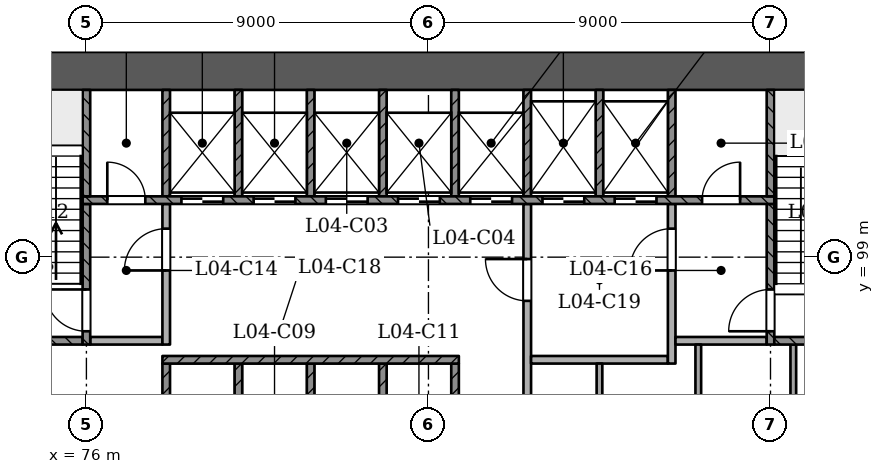
"""IFC4 building model, lengths in metres.
Left out: names, types, materials, properties, quantities, classifications, styles, units other than length and angle.
Written with IfcOpenShell. Run it as: python <this file> out.ifc"""

import sys

from ifc_helpers import new_model, si_unit, direction, frame, frame_2d, origin, place, context, subcontext, project, spatial, rectangle, extrude, element, fill, save


model = new_model("IFC4")
c1 = context("Model", 3, precision=1e-05, world=origin(), true_north=direction((0.0, 1.0)))
c2 = subcontext(c1, "Body", "Model", "MODEL_VIEW")
j1 = project(units=[si_unit("LENGTHUNIT", "METRE"), si_unit("PLANEANGLEUNIT", "RADIAN")], contexts=[c1])
p1 = place(None, origin())
s1 = spatial("IfcSite", under=j1, at=p1, CompositionType="ELEMENT")
p2 = place(p1, origin())
s2 = spatial("IfcBuilding", under=s1, at=p2, CompositionType="ELEMENT")
p3 = place(p2, frame((0.0, 0.0, 22.5)))
s3 = spatial("IfcBuildingStorey", under=s2, at=p3, CompositionType="ELEMENT", Elevation=22.5)
p4 = place(p3, frame((97.5, 103.9, 0.0), z_axis=(0.0, 0.0, 1.0), x_axis=(-1.0, 0.0, 0.0)))
e1 = element("IfcWall", 1, at=p4, inside=s3, PredefinedType="SHEAR", context=c2, shape_type="SweptSolid", body=[
    extrude(rectangle(XDim=25.5, YDim=1.0, at=frame_2d((12.75, 0.0))), origin(), (0.0, 0.0, 1.0), 4.5),
])
p5 = place(p3, frame((61.093, 96.062, 0.0), z_axis=(0.0, 0.0, 1.0), x_axis=(0.5000018851, -0.866024315419, 0.0)))
e2 = element("IfcWall", 2, at=p5, inside=s3, PredefinedType="PARTITIONING", context=c2, shape_type="SweptSolid", body=[
    extrude(rectangle(XDim=45.0, YDim=0.15, at=frame_2d((22.5, 0.0))), origin(), (0.0, 0.0, 1.0), 3.6),
])
p6 = place(p5, frame((6.15, 0.0, 0.0)))
e3 = element("IfcOpeningElement", 3, at=p6, cuts=e2, PredefinedType="OPENING", context=c2, shape_type="SweptSolid", body=[
    extrude(rectangle(XDim=1.2, YDim=2.1, at=frame_2d((0.6, 1.05))), frame((0.0, 0.085, 0.0), z_axis=(0.0, -1.0, 0.0), x_axis=(1.0, 0.0, 0.0)), (0.0, 0.0, 1.0), 0.171),
])
p7 = place(p5, frame((16.3, 0.0, 0.0)))
e4 = element("IfcOpeningElement", 4, at=p7, cuts=e2, PredefinedType="OPENING", context=c2, shape_type="SweptSolid", body=[
    extrude(rectangle(XDim=1.2, YDim=2.1, at=frame_2d((0.6, 1.05))), frame((0.0, 0.085, 0.0), z_axis=(0.0, -1.0, 0.0), x_axis=(1.0, 0.0, 0.0)), (0.0, 0.0, 1.0), 0.171),
])
p8 = place(p5, frame((24.25, 0.0, 0.0)))
e5 = element("IfcOpeningElement", 5, at=p8, cuts=e2, PredefinedType="OPENING", context=c2, shape_type="SweptSolid", body=[
    extrude(rectangle(XDim=1.0, YDim=2.1, at=frame_2d((0.5, 1.05))), frame((0.0, 0.085, 0.0), z_axis=(0.0, -1.0, 0.0), x_axis=(1.0, 0.0, 0.0)), (0.0, 0.0, 1.0), 0.171),
])
p9 = place(p5, frame((27.721, 0.0, 0.0)))
e6 = element("IfcOpeningElement", 6, at=p9, cuts=e2, PredefinedType="OPENING", context=c2, shape_type="SweptSolid", body=[
    extrude(rectangle(XDim=0.9, YDim=2.1, at=frame_2d((0.45, 1.05))), frame((0.0, 0.085, 0.0), z_axis=(0.0, -1.0, 0.0), x_axis=(1.0, 0.0, 0.0)), (0.0, 0.0, 1.0), 0.171),
])
p10 = place(p5, frame((29.971, 0.0, 0.0)))
e7 = element("IfcOpeningElement", 7, at=p10, cuts=e2, PredefinedType="OPENING", context=c2, shape_type="SweptSolid", body=[
    extrude(rectangle(XDim=0.9, YDim=2.1, at=frame_2d((0.45, 1.05))), frame((0.0, 0.085, 0.0), z_axis=(0.0, -1.0, 0.0), x_axis=(1.0, 0.0, 0.0)), (0.0, 0.0, 1.0), 0.171),
])
p11 = place(p5, frame((37.65, 0.0, 0.0)))
e8 = element("IfcOpeningElement", 8, at=p11, cuts=e2, PredefinedType="OPENING", context=c2, shape_type="SweptSolid", body=[
    extrude(rectangle(XDim=1.2, YDim=2.1, at=frame_2d((0.6, 1.05))), frame((0.0, 0.085, 0.0), z_axis=(0.0, -1.0, 0.0), x_axis=(1.0, 0.0, 0.0)), (0.0, 0.0, 1.0), 0.171),
])
p12 = place(p3, frame((86.407, 57.091, 0.0), z_axis=(0.0, 0.0, 1.0), x_axis=(0.49999953585, 0.866025671762, 0.0)))
e9 = element("IfcWall", 9, at=p12, inside=s3, PredefinedType="PARTITIONING", context=c2, shape_type="SweptSolid", body=[
    extrude(rectangle(XDim=45.0, YDim=0.15, at=frame_2d((22.5, 0.0))), origin(), (0.0, 0.0, 1.0), 3.6),
])
p13 = place(p12, frame((6.15, 0.0, 0.0)))
e10 = element("IfcOpeningElement", 10, at=p13, cuts=e9, PredefinedType="OPENING", context=c2, shape_type="SweptSolid", body=[
    extrude(rectangle(XDim=1.2, YDim=2.1, at=frame_2d((0.6, 1.05))), frame((0.0, 0.085, 0.0), z_axis=(0.0, -1.0, 0.0), x_axis=(1.0, 0.0, 0.0)), (0.0, 0.0, 1.0), 0.171),
])
p14 = place(p12, frame((16.3, 0.0, 0.0)))
e11 = element("IfcOpeningElement", 11, at=p14, cuts=e9, PredefinedType="OPENING", context=c2, shape_type="SweptSolid", body=[
    extrude(rectangle(XDim=1.2, YDim=2.1, at=frame_2d((0.6, 1.05))), frame((0.0, 0.085, 0.0), z_axis=(0.0, -1.0, 0.0), x_axis=(1.0, 0.0, 0.0)), (0.0, 0.0, 1.0), 0.171),
])
p15 = place(p12, frame((24.25, 0.0, 0.0)))
e12 = element("IfcOpeningElement", 12, at=p15, cuts=e9, PredefinedType="OPENING", context=c2, shape_type="SweptSolid", body=[
    extrude(rectangle(XDim=1.0, YDim=2.1, at=frame_2d((0.5, 1.05))), frame((0.0, 0.085, 0.0), z_axis=(0.0, -1.0, 0.0), x_axis=(1.0, 0.0, 0.0)), (0.0, 0.0, 1.0), 0.171),
])
p16 = place(p12, frame((30.9, 0.0, 0.0)))
e13 = element("IfcOpeningElement", 13, at=p16, cuts=e9, PredefinedType="OPENING", context=c2, shape_type="SweptSolid", body=[
    extrude(rectangle(XDim=1.2, YDim=2.1, at=frame_2d((0.6, 1.05))), frame((0.0, 0.085, 0.0), z_axis=(0.0, -1.0, 0.0), x_axis=(1.0, 0.0, 0.0)), (0.0, 0.0, 1.0), 0.171),
])
p17 = place(p12, frame((36.761, 0.0, 0.0)))
e14 = element("IfcOpeningElement", 14, at=p17, cuts=e9, PredefinedType="OPENING", context=c2, shape_type="SweptSolid", body=[
    extrude(rectangle(XDim=1.0, YDim=2.1, at=frame_2d((0.5, 1.05))), frame((0.0, 0.085, 0.0), z_axis=(0.0, -1.0, 0.0), x_axis=(1.0, 0.0, 0.0)), (0.0, 0.0, 1.0), 0.171),
])
p18 = place(p12, frame((39.011, 0.0, 0.0)))
e15 = element("IfcOpeningElement", 15, at=p18, cuts=e9, PredefinedType="OPENING", context=c2, shape_type="SweptSolid", body=[
    extrude(rectangle(XDim=1.0, YDim=2.1, at=frame_2d((0.5, 1.05))), frame((0.0, 0.085, 0.0), z_axis=(0.0, -1.0, 0.0), x_axis=(1.0, 0.0, 0.0)), (0.0, 0.0, 1.0), 0.171),
])
p19 = place(p12, frame((42.25, 0.0, 0.0)))
e16 = element("IfcOpeningElement", 16, at=p19, cuts=e9, PredefinedType="OPENING", context=c2, shape_type="SweptSolid", body=[
    extrude(rectangle(XDim=1.0, YDim=2.1, at=frame_2d((0.5, 1.05))), frame((0.0, 0.085, 0.0), z_axis=(0.0, -1.0, 0.0), x_axis=(1.0, 0.0, 0.0)), (0.0, 0.0, 1.0), 0.171),
])
for number, where, z_axis, x_axis in (
    (17, (78.1, 93.4, 0.0), (0.0, 0.0, 1.0), (0.0, 1.0, 0.0)),
    (18, (80.0, 93.4, 0.0), (0.0, 0.0, 1.0), (0.0, 1.0, 0.0)),
    (19, (81.9, 93.4, 0.0), (0.0, 0.0, 1.0), (0.0, 1.0, 0.0)),
    (20, (83.8, 93.4, 0.0), (0.0, 0.0, 1.0), (0.0, 1.0, 0.0)),
    (21, (85.7, 93.4, 0.0), (0.0, 0.0, 1.0), (0.0, 1.0, 0.0)),
):
    element("IfcWall", number, at=place(p3, frame(where, z_axis=z_axis, x_axis=x_axis)), inside=s3, PredefinedType="SOLIDWALL", context=c2, shape_type="SweptSolid", body=[
        extrude(rectangle(XDim=2.8, YDim=0.2, at=frame_2d((1.4, 0.0))), origin(), (0.0, 0.0, 1.0), 4.0),
    ])
p20 = place(p3, frame((87.6, 93.4, 0.0), z_axis=(0.0, 0.0, 1.0), x_axis=(0.0, 1.0, 0.0)))
e22 = element("IfcWall", 22, at=p20, inside=s3, PredefinedType="PARTITIONING", context=c2, shape_type="SweptSolid", body=[
    extrude(rectangle(XDim=7.0, YDim=0.2, at=frame_2d((3.5, 0.0))), origin(), (0.0, 0.0, 1.0), 4.0),
])
p21 = place(p20, frame((4.45, 0.0, 0.0)))
e23 = element("IfcOpeningElement", 23, at=p21, cuts=e22, PredefinedType="OPENING", context=c2, shape_type="SweptSolid", body=[
    extrude(rectangle(XDim=1.1, YDim=2.1, at=frame_2d((0.55, 1.05))), frame((0.0, 0.11, 0.0), z_axis=(0.0, -1.0, 0.0), x_axis=(1.0, 0.0, 0.0)), (0.0, 0.0, 1.0), 0.221),
])
p22 = place(p3, frame((89.5, 93.4, 0.0), z_axis=(0.0, 0.0, 1.0), x_axis=(0.0, 1.0, 0.0)))
e24 = element("IfcWall", 24, at=p22, inside=s3, PredefinedType="PARTITIONING", context=c2, shape_type="SweptSolid", body=[
    extrude(rectangle(XDim=2.8, YDim=0.15, at=frame_2d((1.4, 0.0))), origin(), (0.0, 0.0, 1.0), 4.0),
])
for number, where, z_axis, x_axis in (
    (25, (92.1, 93.4, 0.0), (0.0, 0.0, 1.0), (0.0, 1.0, 0.0)),
    (26, (94.6, 93.4, 0.0), (0.0, 0.0, 1.0), (0.0, 1.0, 0.0)),
):
    element("IfcWall", number, at=place(p3, frame(where, z_axis=z_axis, x_axis=x_axis)), inside=s3, PredefinedType="PARTITIONING", context=c2, shape_type="SweptSolid", body=[
        extrude(rectangle(XDim=3.3, YDim=0.15, at=frame_2d((1.65, 0.0))), origin(), (0.0, 0.0, 1.0), 4.0),
    ])
p23 = place(p3, frame((78.0, 96.3, 0.0), z_axis=(0.0, 0.0, 1.0), x_axis=(1.0, 0.0, 0.0)))
e27 = element("IfcWall", 27, at=p23, inside=s3, PredefinedType="SOLIDWALL", context=c2, shape_type="SweptSolid", body=[
    extrude(rectangle(XDim=7.8, YDim=0.2, at=frame_2d((3.9, 0.0))), origin(), (0.0, 0.0, 1.0), 4.0),
])
p24 = place(p3, frame((87.7, 96.3, 0.0), z_axis=(0.0, 0.0, 1.0), x_axis=(1.0, 0.0, 0.0)))
e28 = element("IfcWall", 28, at=p24, inside=s3, PredefinedType="PARTITIONING", context=c2, shape_type="SweptSolid", body=[
    extrude(rectangle(XDim=3.6, YDim=0.2, at=frame_2d((1.8, 0.0))), origin(), (0.0, 0.0, 1.0), 4.0),
])
p25 = place(p3, frame((91.4, 96.2, 0.0), z_axis=(0.0, 0.0, 1.0), x_axis=(0.0, 1.0, 0.0)))
e29 = element("IfcWall", 29, at=p25, inside=s3, PredefinedType="PARTITIONING", context=c2, shape_type="SweptSolid", body=[
    extrude(rectangle(XDim=4.2, YDim=0.2, at=frame_2d((2.1, 0.0))), origin(), (0.0, 0.0, 1.0), 4.0),
])
p26 = place(p25, frame((2.45, 0.0, 0.0)))
e30 = element("IfcOpeningElement", 30, at=p26, cuts=e29, PredefinedType="OPENING", context=c2, shape_type="SweptSolid", body=[
    extrude(rectangle(XDim=1.1, YDim=2.1, at=frame_2d((0.55, 1.05))), frame((0.0, 0.11, 0.0), z_axis=(0.0, -1.0, 0.0), x_axis=(1.0, 0.0, 0.0)), (0.0, 0.0, 1.0), 0.221),
])
p27 = place(p3, frame((73.0, 96.8, 0.0), z_axis=(0.0, 0.0, 1.0), x_axis=(1.0, 0.0, 0.0)))
e31 = element("IfcWall", 31, at=p27, inside=s3, PredefinedType="SOLIDWALL", context=c2, shape_type="SweptSolid", body=[
    extrude(rectangle(XDim=2.9, YDim=0.2, at=frame_2d((1.45, 0.0))), origin(), (0.0, 0.0, 1.0), 4.0),
])
p28 = place(p3, frame((76.0, 96.7, 0.0), z_axis=(0.0, 0.0, 1.0), x_axis=(0.0, 1.0, 0.0)))
e32 = element("IfcWall", 32, at=p28, inside=s3, PredefinedType="SOLIDWALL", context=c2, shape_type="SweptSolid", body=[
    extrude(rectangle(XDim=3.7, YDim=0.2, at=frame_2d((1.85, 0.0))), origin(), (0.0, 0.0, 1.0), 4.0),
])
p29 = place(p28, frame((0.35, 0.0, 0.0)))
e33 = element("IfcOpeningElement", 33, at=p29, cuts=e32, PredefinedType="OPENING", context=c2, shape_type="SweptSolid", body=[
    extrude(rectangle(XDim=1.1, YDim=2.1, at=frame_2d((0.55, 1.05))), frame((0.0, 0.11, 0.0), z_axis=(0.0, -1.0, 0.0), x_axis=(1.0, 0.0, 0.0)), (0.0, 0.0, 1.0), 0.221),
])
p30 = place(p3, frame((76.1, 96.8, 0.0), z_axis=(0.0, 0.0, 1.0), x_axis=(1.0, 0.0, 0.0)))
e34 = element("IfcWall", 34, at=p30, inside=s3, PredefinedType="PARTITIONING", context=c2, shape_type="SweptSolid", body=[
    extrude(rectangle(XDim=1.9, YDim=0.2, at=frame_2d((0.95, 0.0))), origin(), (0.0, 0.0, 1.0), 4.0),
])
p31 = place(p3, frame((78.1, 96.7, 0.0), z_axis=(0.0, 0.0, 1.0), x_axis=(0.0, 1.0, 0.0)))
e35 = element("IfcWall", 35, at=p31, inside=s3, PredefinedType="PARTITIONING", context=c2, shape_type="SweptSolid", body=[
    extrude(rectangle(XDim=3.7, YDim=0.2, at=frame_2d((1.85, 0.0))), origin(), (0.0, 0.0, 1.0), 4.0),
])
p32 = place(p31, frame((1.95, 0.0, 0.0)))
e36 = element("IfcOpeningElement", 36, at=p32, cuts=e35, PredefinedType="OPENING", context=c2, shape_type="SweptSolid", body=[
    extrude(rectangle(XDim=1.1, YDim=2.1, at=frame_2d((0.55, 1.05))), frame((0.0, 0.11, 0.0), z_axis=(0.0, -1.0, 0.0), x_axis=(1.0, 0.0, 0.0)), (0.0, 0.0, 1.0), 0.221),
])
p33 = place(p3, frame((91.5, 96.8, 0.0), z_axis=(0.0, 0.0, 1.0), x_axis=(1.0, 0.0, 0.0)))
e37 = element("IfcWall", 37, at=p33, inside=s3, PredefinedType="PARTITIONING", context=c2, shape_type="SweptSolid", body=[
    extrude(rectangle(XDim=2.4, YDim=0.2, at=frame_2d((1.2, 0.0))), origin(), (0.0, 0.0, 1.0), 4.0),
])
p34 = place(p3, frame((94.0, 96.7, 0.0), z_axis=(0.0, 0.0, 1.0), x_axis=(0.0, 1.0, 0.0)))
e38 = element("IfcWall", 38, at=p34, inside=s3, PredefinedType="SOLIDWALL", context=c2, shape_type="SweptSolid", body=[
    extrude(rectangle(XDim=3.7, YDim=0.2, at=frame_2d((1.85, 0.0))), origin(), (0.0, 0.0, 1.0), 4.0),
])
p35 = place(p34, frame((0.35, 0.0, 0.0)))
e39 = element("IfcOpeningElement", 39, at=p35, cuts=e38, PredefinedType="OPENING", context=c2, shape_type="SweptSolid", body=[
    extrude(rectangle(XDim=1.1, YDim=2.1, at=frame_2d((0.55, 1.05))), frame((0.0, 0.11, 0.0), z_axis=(0.0, -1.0, 0.0), x_axis=(1.0, 0.0, 0.0)), (0.0, 0.0, 1.0), 0.221),
])
p36 = place(p3, frame((94.1, 96.8, 0.0), z_axis=(0.0, 0.0, 1.0), x_axis=(1.0, 0.0, 0.0)))
e40 = element("IfcWall", 40, at=p36, inside=s3, PredefinedType="SOLIDWALL", context=c2, shape_type="SweptSolid", body=[
    extrude(rectangle(XDim=2.9, YDim=0.2, at=frame_2d((1.45, 0.0))), origin(), (0.0, 0.0, 1.0), 4.0),
])
p37 = place(p3, frame((75.9, 100.5, 0.0), z_axis=(0.0, 0.0, 1.0), x_axis=(1.0, 0.0, 0.0)))
e41 = element("IfcWall", 41, at=p37, inside=s3, PredefinedType="SOLIDWALL", context=c2, shape_type="SweptSolid", body=[
    extrude(rectangle(XDim=18.2, YDim=0.2, at=frame_2d((9.1, 0.0))), origin(), (0.0, 0.0, 1.0), 4.0),
])
p38 = place(p37, frame((2.6, 0.0, 0.0)))
e42 = element("IfcOpeningElement", 42, at=p38, cuts=e41, PredefinedType="OPENING", context=c2, shape_type="SweptSolid", body=[
    extrude(rectangle(XDim=1.1, YDim=2.1, at=frame_2d((0.55, 1.05))), frame((0.0, 0.11, 0.0), z_axis=(0.0, -1.0, 0.0), x_axis=(1.0, 0.0, 0.0)), (0.0, 0.0, 1.0), 0.221),
])
p39 = place(p37, frame((4.5, 0.0, 0.0)))
e43 = element("IfcOpeningElement", 43, at=p39, cuts=e41, PredefinedType="OPENING", context=c2, shape_type="SweptSolid", body=[
    extrude(rectangle(XDim=1.1, YDim=2.1, at=frame_2d((0.55, 1.05))), frame((0.0, 0.11, 0.0), z_axis=(0.0, -1.0, 0.0), x_axis=(1.0, 0.0, 0.0)), (0.0, 0.0, 1.0), 0.221),
])
p40 = place(p37, frame((6.4, 0.0, 0.0)))
e44 = element("IfcOpeningElement", 44, at=p40, cuts=e41, PredefinedType="OPENING", context=c2, shape_type="SweptSolid", body=[
    extrude(rectangle(XDim=1.1, YDim=2.1, at=frame_2d((0.55, 1.05))), frame((0.0, 0.11, 0.0), z_axis=(0.0, -1.0, 0.0), x_axis=(1.0, 0.0, 0.0)), (0.0, 0.0, 1.0), 0.221),
])
p41 = place(p37, frame((8.3, 0.0, 0.0)))
e45 = element("IfcOpeningElement", 45, at=p41, cuts=e41, PredefinedType="OPENING", context=c2, shape_type="SweptSolid", body=[
    extrude(rectangle(XDim=1.1, YDim=2.1, at=frame_2d((0.55, 1.05))), frame((0.0, 0.11, 0.0), z_axis=(0.0, -1.0, 0.0), x_axis=(1.0, 0.0, 0.0)), (0.0, 0.0, 1.0), 0.221),
])
p42 = place(p37, frame((10.2, 0.0, 0.0)))
e46 = element("IfcOpeningElement", 46, at=p42, cuts=e41, PredefinedType="OPENING", context=c2, shape_type="SweptSolid", body=[
    extrude(rectangle(XDim=1.1, YDim=2.1, at=frame_2d((0.55, 1.05))), frame((0.0, 0.11, 0.0), z_axis=(0.0, -1.0, 0.0), x_axis=(1.0, 0.0, 0.0)), (0.0, 0.0, 1.0), 0.221),
])
p43 = place(p37, frame((12.1, 0.0, 0.0)))
e47 = element("IfcOpeningElement", 47, at=p43, cuts=e41, PredefinedType="OPENING", context=c2, shape_type="SweptSolid", body=[
    extrude(rectangle(XDim=1.1, YDim=2.1, at=frame_2d((0.55, 1.05))), frame((0.0, 0.11, 0.0), z_axis=(0.0, -1.0, 0.0), x_axis=(1.0, 0.0, 0.0)), (0.0, 0.0, 1.0), 0.221),
])
p44 = place(p37, frame((14.0, 0.0, 0.0)))
e48 = element("IfcOpeningElement", 48, at=p44, cuts=e41, PredefinedType="OPENING", context=c2, shape_type="SweptSolid", body=[
    extrude(rectangle(XDim=1.1, YDim=2.1, at=frame_2d((0.55, 1.05))), frame((0.0, 0.11, 0.0), z_axis=(0.0, -1.0, 0.0), x_axis=(1.0, 0.0, 0.0)), (0.0, 0.0, 1.0), 0.221),
])
p45 = place(p37, frame((0.65, 0.0, 0.0)))
e49 = element("IfcOpeningElement", 49, at=p45, cuts=e41, PredefinedType="OPENING", context=c2, shape_type="SweptSolid", body=[
    extrude(rectangle(XDim=1.0, YDim=2.1, at=frame_2d((0.5, 1.05))), frame((0.0, 0.11, 0.0), z_axis=(0.0, -1.0, 0.0), x_axis=(1.0, 0.0, 0.0)), (0.0, 0.0, 1.0), 0.221),
])
p46 = place(p37, frame((16.3, 0.0, 0.0)))
e50 = element("IfcOpeningElement", 50, at=p46, cuts=e41, PredefinedType="OPENING", context=c2, shape_type="SweptSolid", body=[
    extrude(rectangle(XDim=1.0, YDim=2.1, at=frame_2d((0.5, 1.05))), frame((0.0, 0.11, 0.0), z_axis=(0.0, -1.0, 0.0), x_axis=(1.0, 0.0, 0.0)), (0.0, 0.0, 1.0), 0.221),
])
for number, where, z_axis, x_axis in (
    (51, (76.0, 100.6, 0.0), (0.0, 0.0, 1.0), (0.0, 1.0, 0.0)),
    (52, (78.1, 100.6, 0.0), (0.0, 0.0, 1.0), (0.0, 1.0, 0.0)),
    (53, (80.0, 100.6, 0.0), (0.0, 0.0, 1.0), (0.0, 1.0, 0.0)),
    (54, (81.9, 100.6, 0.0), (0.0, 0.0, 1.0), (0.0, 1.0, 0.0)),
    (55, (83.8, 100.6, 0.0), (0.0, 0.0, 1.0), (0.0, 1.0, 0.0)),
    (56, (85.7, 100.6, 0.0), (0.0, 0.0, 1.0), (0.0, 1.0, 0.0)),
    (57, (87.6, 100.6, 0.0), (0.0, 0.0, 1.0), (0.0, 1.0, 0.0)),
    (58, (89.5, 100.6, 0.0), (0.0, 0.0, 1.0), (0.0, 1.0, 0.0)),
    (59, (91.4, 100.6, 0.0), (0.0, 0.0, 1.0), (0.0, 1.0, 0.0)),
    (60, (94.0, 100.6, 0.0), (0.0, 0.0, 1.0), (0.0, 1.0, 0.0)),
):
    element("IfcWall", number, at=place(p3, frame(where, z_axis=z_axis, x_axis=x_axis)), inside=s3, PredefinedType="SOLIDWALL", context=c2, shape_type="SweptSolid", body=[
        extrude(rectangle(XDim=2.8, YDim=0.2, at=frame_2d((1.4, 0.0))), origin(), (0.0, 0.0, 1.0), 4.0),
    ])
p47 = place(p38, origin())
e61 = element("IfcDoor", 61, at=p47, inside=s3, OperationType="SLIDING_TO_RIGHT", PredefinedType="NOTDEFINED", context=c2, shape_type="SweptSolid", body=[
    extrude(rectangle(XDim=1.1, YDim=2.1, at=frame_2d((0.55, 1.05))), frame((0.0, 0.025, 0.0), z_axis=(0.0, -1.0, 0.0), x_axis=(1.0, 0.0, 0.0)), (0.0, 0.0, 1.0), 0.05),
])
fill(e42, e61)
p48 = place(p39, origin())
e62 = element("IfcDoor", 62, at=p48, inside=s3, OperationType="SLIDING_TO_LEFT", PredefinedType="NOTDEFINED", context=c2, shape_type="SweptSolid", body=[
    extrude(rectangle(XDim=1.1, YDim=2.1, at=frame_2d((0.55, 1.05))), frame((0.0, 0.025, 0.0), z_axis=(0.0, -1.0, 0.0), x_axis=(1.0, 0.0, 0.0)), (0.0, 0.0, 1.0), 0.05),
])
fill(e43, e62)
p49 = place(p40, origin())
e63 = element("IfcDoor", 63, at=p49, inside=s3, OperationType="SLIDING_TO_RIGHT", PredefinedType="NOTDEFINED", context=c2, shape_type="SweptSolid", body=[
    extrude(rectangle(XDim=1.1, YDim=2.1, at=frame_2d((0.55, 1.05))), frame((0.0, 0.025, 0.0), z_axis=(0.0, -1.0, 0.0), x_axis=(1.0, 0.0, 0.0)), (0.0, 0.0, 1.0), 0.05),
])
fill(e44, e63)
p50 = place(p41, origin())
e64 = element("IfcDoor", 64, at=p50, inside=s3, OperationType="SLIDING_TO_LEFT", PredefinedType="NOTDEFINED", context=c2, shape_type="SweptSolid", body=[
    extrude(rectangle(XDim=1.1, YDim=2.1, at=frame_2d((0.55, 1.05))), frame((0.0, 0.025, 0.0), z_axis=(0.0, -1.0, 0.0), x_axis=(1.0, 0.0, 0.0)), (0.0, 0.0, 1.0), 0.05),
])
fill(e45, e64)
p51 = place(p42, origin())
e65 = element("IfcDoor", 65, at=p51, inside=s3, OperationType="SLIDING_TO_RIGHT", PredefinedType="NOTDEFINED", context=c2, shape_type="SweptSolid", body=[
    extrude(rectangle(XDim=1.1, YDim=2.1, at=frame_2d((0.55, 1.05))), frame((0.0, 0.025, 0.0), z_axis=(0.0, -1.0, 0.0), x_axis=(1.0, 0.0, 0.0)), (0.0, 0.0, 1.0), 0.05),
])
fill(e46, e65)
p52 = place(p43, origin())
e66 = element("IfcDoor", 66, at=p52, inside=s3, OperationType="SLIDING_TO_RIGHT", PredefinedType="NOTDEFINED", context=c2, shape_type="SweptSolid", body=[
    extrude(rectangle(XDim=1.1, YDim=2.1, at=frame_2d((0.55, 1.05))), frame((0.0, 0.025, 0.0), z_axis=(0.0, -1.0, 0.0), x_axis=(1.0, 0.0, 0.0)), (0.0, 0.0, 1.0), 0.05),
])
fill(e47, e66)
p53 = place(p44, origin())
e67 = element("IfcDoor", 67, at=p53, inside=s3, OperationType="SLIDING_TO_LEFT", PredefinedType="NOTDEFINED", context=c2, shape_type="SweptSolid", body=[
    extrude(rectangle(XDim=1.1, YDim=2.1, at=frame_2d((0.55, 1.05))), frame((0.0, 0.025, 0.0), z_axis=(0.0, -1.0, 0.0), x_axis=(1.0, 0.0, 0.0)), (0.0, 0.0, 1.0), 0.05),
])
fill(e48, e67)
p54 = place(p29, origin())
e68 = element("IfcDoor", 68, at=p54, inside=s3, OperationType="SINGLE_SWING_RIGHT", PredefinedType="NOTDEFINED", context=c2, shape_type="SweptSolid", body=[
    extrude(rectangle(XDim=1.1, YDim=2.1, at=frame_2d((0.55, 1.05))), frame((0.0, 0.025, 0.0), z_axis=(0.0, -1.0, 0.0), x_axis=(1.0, 0.0, 0.0)), (0.0, 0.0, 1.0), 0.05),
])
fill(e33, e68)
p55 = place(p35, origin())
e69 = element("IfcDoor", 69, at=p55, inside=s3, OperationType="SINGLE_SWING_LEFT", PredefinedType="NOTDEFINED", context=c2, shape_type="SweptSolid", body=[
    extrude(rectangle(XDim=1.1, YDim=2.1, at=frame_2d((0.55, 1.05))), frame((0.0, 0.025, 0.0), z_axis=(0.0, -1.0, 0.0), x_axis=(1.0, 0.0, 0.0)), (0.0, 0.0, 1.0), 0.05),
])
fill(e39, e69)
p56 = place(p32, origin())
e70 = element("IfcDoor", 70, at=p56, inside=s3, OperationType="SINGLE_SWING_LEFT", PredefinedType="NOTDEFINED", context=c2, shape_type="SweptSolid", body=[
    extrude(rectangle(XDim=1.1, YDim=2.1, at=frame_2d((0.55, 1.05))), frame((0.0, 0.025, 0.0), z_axis=(0.0, -1.0, 0.0), x_axis=(1.0, 0.0, 0.0)), (0.0, 0.0, 1.0), 0.05),
])
fill(e36, e70)
p57 = place(p21, origin())
e71 = element("IfcDoor", 71, at=p57, inside=s3, OperationType="SINGLE_SWING_RIGHT", PredefinedType="NOTDEFINED", context=c2, shape_type="SweptSolid", body=[
    extrude(rectangle(XDim=1.1, YDim=2.1, at=frame_2d((0.55, 1.05))), frame((0.0, 0.025, 0.0), z_axis=(0.0, -1.0, 0.0), x_axis=(1.0, 0.0, 0.0)), (0.0, 0.0, 1.0), 0.05),
])
fill(e23, e71)
p58 = place(p26, origin())
e72 = element("IfcDoor", 72, at=p58, inside=s3, OperationType="SINGLE_SWING_LEFT", PredefinedType="NOTDEFINED", context=c2, shape_type="SweptSolid", body=[
    extrude(rectangle(XDim=1.1, YDim=2.1, at=frame_2d((0.55, 1.05))), frame((0.0, 0.025, 0.0), z_axis=(0.0, -1.0, 0.0), x_axis=(1.0, 0.0, 0.0)), (0.0, 0.0, 1.0), 0.05),
])
fill(e30, e72)
p59 = place(p45, origin())
e73 = element("IfcDoor", 73, at=p59, inside=s3, OperationType="SINGLE_SWING_LEFT", PredefinedType="NOTDEFINED", context=c2, shape_type="SweptSolid", body=[
    extrude(rectangle(XDim=1.0, YDim=2.1, at=frame_2d((0.5, 1.05))), frame((0.0, 0.025, 0.0), z_axis=(0.0, -1.0, 0.0), x_axis=(1.0, 0.0, 0.0)), (0.0, 0.0, 1.0), 0.05),
])
fill(e49, e73)
p60 = place(p46, origin())
e74 = element("IfcDoor", 74, at=p60, inside=s3, OperationType="SINGLE_SWING_RIGHT", PredefinedType="NOTDEFINED", context=c2, shape_type="SweptSolid", body=[
    extrude(rectangle(XDim=1.0, YDim=2.1, at=frame_2d((0.5, 1.05))), frame((0.0, 0.025, 0.0), z_axis=(0.0, -1.0, 0.0), x_axis=(1.0, 0.0, 0.0)), (0.0, 0.0, 1.0), 0.05),
])
fill(e50, e74)
save(model, sys.argv[1])
